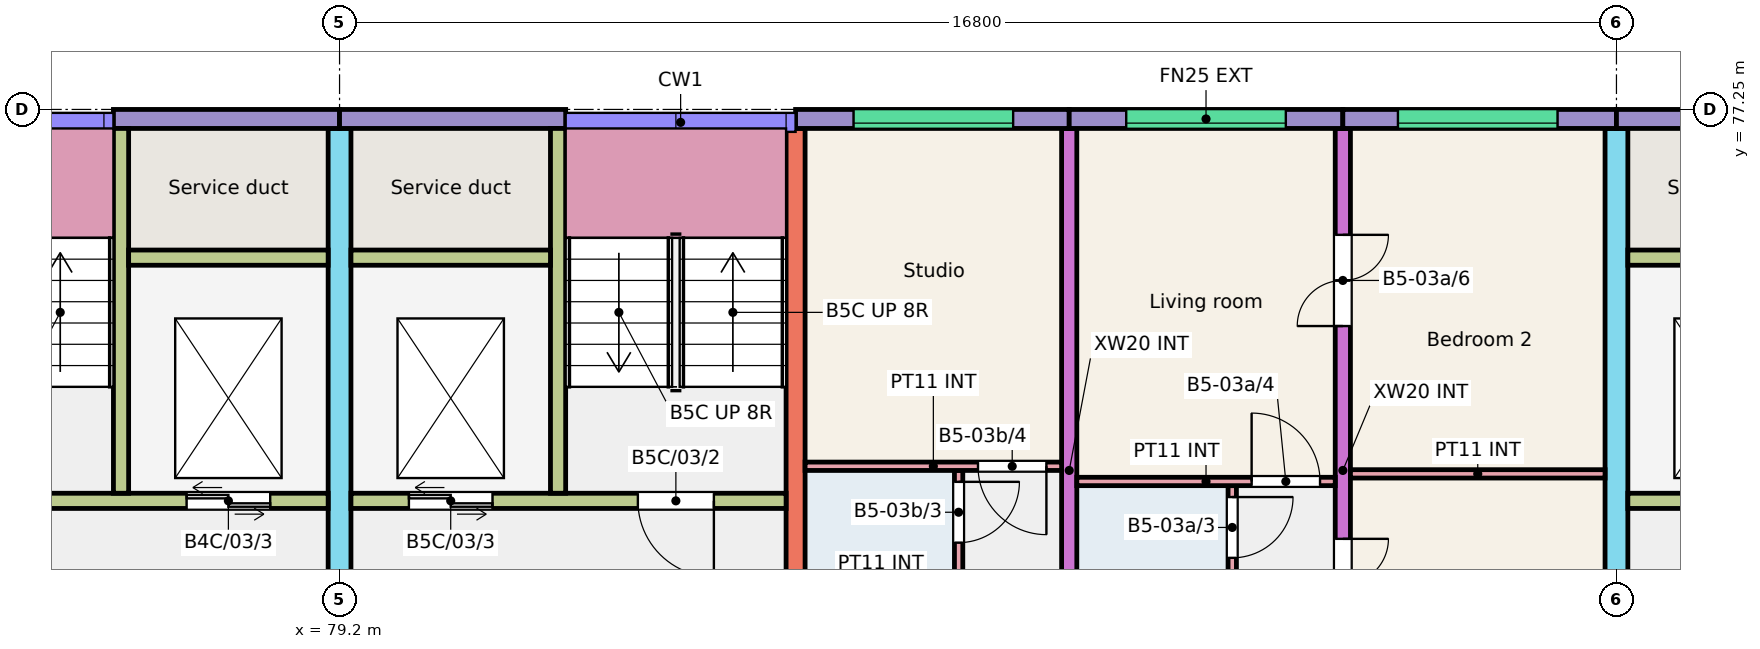
"""IFC4 building model, lengths in metres.
Left out: names, types, materials, properties, quantities, classifications, styles, units other than length and angle.
Written with IfcOpenShell. Run it as: python <this file> out.ifc"""

import sys

from ifc_helpers import new_model, si_unit, direction, frame, frame_2d, origin, place, context, subcontext, project, spatial, rectangle, extrude, element, fill, save


model = new_model("IFC4")
c1 = context("Model", 3, precision=1e-05, world=origin(), true_north=direction((0.0, 1.0)))
c2 = subcontext(c1, "Body", "Model", "MODEL_VIEW")
j1 = project(units=[si_unit("LENGTHUNIT", "METRE"), si_unit("PLANEANGLEUNIT", "RADIAN")], contexts=[c1])
p1 = place(None, origin())
s1 = spatial("IfcSite", under=j1, at=p1, CompositionType="ELEMENT")
p2 = place(p1, origin())
s2 = spatial("IfcBuilding", under=s1, at=p2, CompositionType="ELEMENT")
p3 = place(p2, frame((0.0, 0.0, 9.0)))
s3 = spatial("IfcBuildingStorey", under=s2, at=p3, CompositionType="ELEMENT", Elevation=9.0)
p4 = place(p3, frame((79.2, 66.0, 0.0), z_axis=(0.0, 0.0, 1.0), x_axis=(0.0, 1.0, 0.0)))
e1 = element("IfcWall", 1, at=p4, inside=s3, PredefinedType="SHEAR", context=c2, shape_type="SweptSolid", body=[
    extrude(rectangle(XDim=11.0, YDim=0.3, at=frame_2d((5.5, 0.0))), origin(), (0.0, 0.0, 1.0), 3.0),
])
p5 = place(p4, frame((0.3, 0.0, 0.0)))
e2 = element("IfcOpeningElement", 2, at=p5, cuts=e1, PredefinedType="OPENING", context=c2, shape_type="SweptSolid", body=[
    extrude(rectangle(XDim=1.2, YDim=2.1, at=frame_2d((0.6, 1.05))), frame((0.0, 0.16, 0.0), z_axis=(0.0, -1.0, 0.0), x_axis=(1.0, 0.0, 0.0)), (0.0, 0.0, 1.0), 0.32),
])
p6 = place(p3, frame((85.2, 68.0, 0.0), z_axis=(0.0, 0.0, 1.0), x_axis=(0.0, 1.0, 0.0)))
e3 = element("IfcWall", 3, at=p6, inside=s3, PredefinedType="SHEAR", context=c2, shape_type="SweptSolid", body=[
    extrude(rectangle(XDim=9.0, YDim=0.25, at=frame_2d((4.5, 0.0))), origin(), (0.0, 0.0, 1.0), 3.0),
])
p7 = place(p3, frame((88.8, 68.0, 0.0), z_axis=(0.0, 0.0, 1.0), x_axis=(0.0, 1.0, 0.0)))
e4 = element("IfcWall", 4, at=p7, inside=s3, PredefinedType="SHEAR", context=c2, shape_type="SweptSolid", body=[
    extrude(rectangle(XDim=9.0, YDim=0.2, at=frame_2d((4.5, 0.0))), origin(), (0.0, 0.0, 1.0), 3.0),
])
p8 = place(p3, frame((92.4, 68.0, 0.0), z_axis=(0.0, 0.0, 1.0), x_axis=(0.0, 1.0, 0.0)))
e5 = element("IfcWall", 5, at=p8, inside=s3, PredefinedType="SHEAR", context=c2, shape_type="SweptSolid", body=[
    extrude(rectangle(XDim=9.0, YDim=0.2, at=frame_2d((4.5, 0.0))), origin(), (0.0, 0.0, 1.0), 3.0),
])
p9 = place(p8, frame((2.4, 0.0, 0.0)))
e6 = element("IfcOpeningElement", 6, at=p9, cuts=e5, PredefinedType="OPENING", context=c2, shape_type="SweptSolid", body=[
    extrude(rectangle(XDim=1.2, YDim=2.1, at=frame_2d((0.6, 1.05))), frame((0.0, 0.11, 0.0), z_axis=(0.0, -1.0, 0.0), x_axis=(1.0, 0.0, 0.0)), (0.0, 0.0, 1.0), 0.22),
])
p10 = place(p8, frame((6.4, 0.0, 0.0)))
e7 = element("IfcOpeningElement", 7, at=p10, cuts=e5, PredefinedType="OPENING", context=c2, shape_type="SweptSolid", body=[
    extrude(rectangle(XDim=1.2, YDim=2.1, at=frame_2d((0.6, 1.05))), frame((0.0, 0.11, 0.0), z_axis=(0.0, -1.0, 0.0), x_axis=(1.0, 0.0, 0.0)), (0.0, 0.0, 1.0), 0.22),
])
p11 = place(p3, frame((96.0, 66.0, 0.0), z_axis=(0.0, 0.0, 1.0), x_axis=(0.0, 1.0, 0.0)))
e8 = element("IfcWall", 8, at=p11, inside=s3, PredefinedType="SHEAR", context=c2, shape_type="SweptSolid", body=[
    extrude(rectangle(XDim=11.0, YDim=0.3, at=frame_2d((5.5, 0.0))), origin(), (0.0, 0.0, 1.0), 3.0),
])
p12 = place(p11, frame((0.3, 0.0, 0.0)))
e9 = element("IfcOpeningElement", 9, at=p12, cuts=e8, PredefinedType="OPENING", context=c2, shape_type="SweptSolid", body=[
    extrude(rectangle(XDim=1.2, YDim=2.1, at=frame_2d((0.6, 1.05))), frame((0.0, 0.16, 0.0), z_axis=(0.0, -1.0, 0.0), x_axis=(1.0, 0.0, 0.0)), (0.0, 0.0, 1.0), 0.32),
])
p13 = place(p3, frame((76.225, 77.125, 0.0), z_axis=(0.0, 0.0, 1.0), x_axis=(1.0, 0.0, 0.0)))
e10 = element("IfcWall", 10, at=p13, inside=s3, PredefinedType="SOLIDWALL", context=c2, shape_type="SweptSolid", body=[
    extrude(rectangle(XDim=2.975, YDim=0.25, at=frame_2d((1.487, 0.0))), origin(), (0.0, 0.0, 1.0), 3.0),
])
p14 = place(p3, frame((73.325, 72.1, 0.0), z_axis=(0.0, 0.0, 1.0), x_axis=(1.0, 0.0, 0.0)))
e11 = element("IfcWall", 11, at=p14, inside=s3, PredefinedType="SHEAR", context=c2, shape_type="SweptSolid", body=[
    extrude(rectangle(XDim=5.725, YDim=0.2, at=frame_2d((2.863, 0.0))), origin(), (0.0, 0.0, 1.0), 3.0),
])
p15 = place(p14, frame((0.95, 0.0, 0.0)))
e12 = element("IfcOpeningElement", 12, at=p15, cuts=e11, PredefinedType="OPENING", context=c2, shape_type="SweptSolid", body=[
    extrude(rectangle(XDim=1.0, YDim=2.1, at=frame_2d((0.5, 1.05))), frame((0.0, 0.11, 0.0), z_axis=(0.0, -1.0, 0.0), x_axis=(1.0, 0.0, 0.0)), (0.0, 0.0, 1.0), 0.22),
])
p16 = place(p14, frame((3.863, 0.0, 0.0)))
e13 = element("IfcOpeningElement", 13, at=p16, cuts=e11, PredefinedType="OPENING", context=c2, shape_type="SweptSolid", body=[
    extrude(rectangle(XDim=1.1, YDim=2.1, at=frame_2d((0.55, 1.05))), frame((0.0, 0.11, 0.0), z_axis=(0.0, -1.0, 0.0), x_axis=(1.0, 0.0, 0.0)), (0.0, 0.0, 1.0), 0.22),
])
p17 = place(p3, frame((76.325, 72.2, 0.0), z_axis=(0.0, 0.0, 1.0), x_axis=(0.0, 1.0, 0.0)))
e14 = element("IfcWall", 14, at=p17, inside=s3, PredefinedType="SHEAR", context=c2, shape_type="SweptSolid", body=[
    extrude(rectangle(XDim=4.8, YDim=0.2, at=frame_2d((2.4, 0.0))), origin(), (0.0, 0.0, 1.0), 3.0),
])
p18 = place(p3, frame((76.425, 75.3, 0.0), z_axis=(0.0, 0.0, 1.0), x_axis=(1.0, 0.0, 0.0)))
e15 = element("IfcWall", 15, at=p18, inside=s3, PredefinedType="SHEAR", context=c2, shape_type="SweptSolid", body=[
    extrude(rectangle(XDim=2.625, YDim=0.2, at=frame_2d((1.312, 0.0))), origin(), (0.0, 0.0, 1.0), 3.0),
])
p19 = place(p3, frame((79.2, 77.125, 0.0), z_axis=(0.0, 0.0, 1.0), x_axis=(1.0, 0.0, 0.0)))
e16 = element("IfcWall", 16, at=p19, inside=s3, PredefinedType="SOLIDWALL", context=c2, shape_type="SweptSolid", body=[
    extrude(rectangle(XDim=2.975, YDim=0.25, at=frame_2d((1.488, 0.0))), origin(), (0.0, 0.0, 1.0), 3.0),
])
p20 = place(p3, frame((79.35, 72.1, 0.0), z_axis=(0.0, 0.0, 1.0), x_axis=(1.0, 0.0, 0.0)))
e17 = element("IfcWall", 17, at=p20, inside=s3, PredefinedType="SHEAR", context=c2, shape_type="SweptSolid", body=[
    extrude(rectangle(XDim=5.725, YDim=0.2, at=frame_2d((2.862, 0.0))), origin(), (0.0, 0.0, 1.0), 3.0),
])
p21 = place(p20, frame((3.775, 0.0, 0.0)))
e18 = element("IfcOpeningElement", 18, at=p21, cuts=e17, PredefinedType="OPENING", context=c2, shape_type="SweptSolid", body=[
    extrude(rectangle(XDim=1.0, YDim=2.1, at=frame_2d((0.5, 1.05))), frame((0.0, 0.11, 0.0), z_axis=(0.0, -1.0, 0.0), x_axis=(1.0, 0.0, 0.0)), (0.0, 0.0, 1.0), 0.22),
])
p22 = place(p20, frame((0.762, 0.0, 0.0)))
e19 = element("IfcOpeningElement", 19, at=p22, cuts=e17, PredefinedType="OPENING", context=c2, shape_type="SweptSolid", body=[
    extrude(rectangle(XDim=1.1, YDim=2.1, at=frame_2d((0.55, 1.05))), frame((0.0, 0.11, 0.0), z_axis=(0.0, -1.0, 0.0), x_axis=(1.0, 0.0, 0.0)), (0.0, 0.0, 1.0), 0.22),
])
p23 = place(p3, frame((82.075, 72.2, 0.0), z_axis=(0.0, 0.0, 1.0), x_axis=(0.0, 1.0, 0.0)))
e20 = element("IfcWall", 20, at=p23, inside=s3, PredefinedType="SHEAR", context=c2, shape_type="SweptSolid", body=[
    extrude(rectangle(XDim=4.8, YDim=0.2, at=frame_2d((2.4, 0.0))), origin(), (0.0, 0.0, 1.0), 3.0),
])
p24 = place(p3, frame((79.35, 75.3, 0.0), z_axis=(0.0, 0.0, 1.0), x_axis=(1.0, 0.0, 0.0)))
e21 = element("IfcWall", 21, at=p24, inside=s3, PredefinedType="SHEAR", context=c2, shape_type="SweptSolid", body=[
    extrude(rectangle(XDim=2.625, YDim=0.2, at=frame_2d((1.312, 0.0))), origin(), (0.0, 0.0, 1.0), 3.0),
])
p25 = place(p3, frame((85.2, 77.125, 0.0), z_axis=(0.0, 0.0, 1.0), x_axis=(1.0, 0.0, 0.0)))
e22 = element("IfcWall", 22, at=p25, inside=s3, PredefinedType="SOLIDWALL", context=c2, shape_type="SweptSolid", body=[
    extrude(rectangle(XDim=3.6, YDim=0.25, at=frame_2d((1.8, 0.0))), origin(), (0.0, 0.0, 1.0), 3.0),
])
p26 = place(p25, frame((0.762, 0.0, 1.2)))
e23 = element("IfcOpeningElement", 23, at=p26, cuts=e22, PredefinedType="OPENING", context=c2, shape_type="SweptSolid", body=[
    extrude(rectangle(XDim=2.1, YDim=1.2, at=frame_2d((1.05, 0.6))), frame((0.0, 0.135, 0.0), z_axis=(0.0, -1.0, 0.0), x_axis=(1.0, 0.0, 0.0)), (0.0, 0.0, 1.0), 0.27),
])
p27 = place(p3, frame((88.8, 77.125, 0.0), z_axis=(0.0, 0.0, 1.0), x_axis=(1.0, 0.0, 0.0)))
e24 = element("IfcWall", 24, at=p27, inside=s3, PredefinedType="SOLIDWALL", context=c2, shape_type="SweptSolid", body=[
    extrude(rectangle(XDim=3.6, YDim=0.25, at=frame_2d((1.8, 0.0))), origin(), (0.0, 0.0, 1.0), 3.0),
])
p28 = place(p27, frame((0.75, 0.0, 1.2)))
e25 = element("IfcOpeningElement", 25, at=p28, cuts=e24, PredefinedType="OPENING", context=c2, shape_type="SweptSolid", body=[
    extrude(rectangle(XDim=2.1, YDim=1.2, at=frame_2d((1.05, 0.6))), frame((0.0, 0.135, 0.0), z_axis=(0.0, -1.0, 0.0), x_axis=(1.0, 0.0, 0.0)), (0.0, 0.0, 1.0), 0.27),
])
p29 = place(p3, frame((92.4, 77.125, 0.0), z_axis=(0.0, 0.0, 1.0), x_axis=(1.0, 0.0, 0.0)))
e26 = element("IfcWall", 26, at=p29, inside=s3, PredefinedType="SOLIDWALL", context=c2, shape_type="SweptSolid", body=[
    extrude(rectangle(XDim=3.6, YDim=0.25, at=frame_2d((1.8, 0.0))), origin(), (0.0, 0.0, 1.0), 3.0),
])
p30 = place(p29, frame((0.725, 0.0, 1.2)))
e27 = element("IfcOpeningElement", 27, at=p30, cuts=e26, PredefinedType="OPENING", context=c2, shape_type="SweptSolid", body=[
    extrude(rectangle(XDim=2.1, YDim=1.2, at=frame_2d((1.05, 0.6))), frame((0.0, 0.135, 0.0), z_axis=(0.0, -1.0, 0.0), x_axis=(1.0, 0.0, 0.0)), (0.0, 0.0, 1.0), 0.27),
])
p31 = place(p3, frame((96.0, 77.125, 0.0), z_axis=(0.0, 0.0, 1.0), x_axis=(1.0, 0.0, 0.0)))
e28 = element("IfcWall", 28, at=p31, inside=s3, PredefinedType="SOLIDWALL", context=c2, shape_type="SweptSolid", body=[
    extrude(rectangle(XDim=2.975, YDim=0.25, at=frame_2d((1.488, 0.0))), origin(), (0.0, 0.0, 1.0), 3.0),
])
p32 = place(p3, frame((96.15, 72.1, 0.0), z_axis=(0.0, 0.0, 1.0), x_axis=(1.0, 0.0, 0.0)))
e29 = element("IfcWall", 29, at=p32, inside=s3, PredefinedType="SHEAR", context=c2, shape_type="SweptSolid", body=[
    extrude(rectangle(XDim=5.725, YDim=0.2, at=frame_2d((2.863, 0.0))), origin(), (0.0, 0.0, 1.0), 3.0),
])
p33 = place(p32, frame((3.775, 0.0, 0.0)))
e30 = element("IfcOpeningElement", 30, at=p33, cuts=e29, PredefinedType="OPENING", context=c2, shape_type="SweptSolid", body=[
    extrude(rectangle(XDim=1.0, YDim=2.1, at=frame_2d((0.5, 1.05))), frame((0.0, 0.11, 0.0), z_axis=(0.0, -1.0, 0.0), x_axis=(1.0, 0.0, 0.0)), (0.0, 0.0, 1.0), 0.22),
])
p34 = place(p32, frame((0.762, 0.0, 0.0)))
e31 = element("IfcOpeningElement", 31, at=p34, cuts=e29, PredefinedType="OPENING", context=c2, shape_type="SweptSolid", body=[
    extrude(rectangle(XDim=1.1, YDim=2.1, at=frame_2d((0.55, 1.05))), frame((0.0, 0.11, 0.0), z_axis=(0.0, -1.0, 0.0), x_axis=(1.0, 0.0, 0.0)), (0.0, 0.0, 1.0), 0.22),
])
p35 = place(p3, frame((96.15, 75.3, 0.0), z_axis=(0.0, 0.0, 1.0), x_axis=(1.0, 0.0, 0.0)))
e32 = element("IfcWall", 32, at=p35, inside=s3, PredefinedType="SHEAR", context=c2, shape_type="SweptSolid", body=[
    extrude(rectangle(XDim=2.625, YDim=0.2, at=frame_2d((1.312, 0.0))), origin(), (0.0, 0.0, 1.0), 3.0),
])
p36 = place(p3, frame((90.945, 68.0, 0.0), z_axis=(0.0, 0.0, 1.0), x_axis=(0.0, 1.0, 0.0)))
e33 = element("IfcWall", 33, at=p36, inside=s3, PredefinedType="PARTITIONING", context=c2, shape_type="SweptSolid", body=[
    extrude(rectangle(XDim=4.3, YDim=0.11, at=frame_2d((2.15, 0.0))), origin(), (0.0, 0.0, 1.0), 2.8),
])
p37 = place(p36, frame((0.2, 0.0, 0.0)))
e34 = element("IfcOpeningElement", 34, at=p37, cuts=e33, PredefinedType="OPENING", context=c2, shape_type="SweptSolid", body=[
    extrude(rectangle(XDim=0.8, YDim=2.1, at=frame_2d((0.4, 1.05))), frame((0.0, 0.065, 0.0), z_axis=(0.0, -1.0, 0.0), x_axis=(1.0, 0.0, 0.0)), (0.0, 0.0, 1.0), 0.13),
])
p38 = place(p36, frame((3.35, 0.0, 0.0)))
e35 = element("IfcOpeningElement", 35, at=p38, cuts=e33, PredefinedType="OPENING", context=c2, shape_type="SweptSolid", body=[
    extrude(rectangle(XDim=0.8, YDim=2.1, at=frame_2d((0.4, 1.05))), frame((0.0, 0.065, 0.0), z_axis=(0.0, -1.0, 0.0), x_axis=(1.0, 0.0, 0.0)), (0.0, 0.0, 1.0), 0.13),
])
p39 = place(p3, frame((88.9, 72.355, 0.0), z_axis=(0.0, 0.0, 1.0), x_axis=(1.0, 0.0, 0.0)))
e36 = element("IfcWall", 36, at=p39, inside=s3, PredefinedType="PARTITIONING", context=c2, shape_type="SweptSolid", body=[
    extrude(rectangle(XDim=3.4, YDim=0.11, at=frame_2d((1.7, 0.0))), origin(), (0.0, 0.0, 1.0), 2.8),
])
p40 = place(p39, frame((2.3, 0.0, 0.0)))
e37 = element("IfcOpeningElement", 37, at=p40, cuts=e36, PredefinedType="OPENING", context=c2, shape_type="SweptSolid", body=[
    extrude(rectangle(XDim=0.9, YDim=2.1, at=frame_2d((0.45, 1.05))), frame((0.0, 0.065, 0.0), z_axis=(0.0, -1.0, 0.0), x_axis=(1.0, 0.0, 0.0)), (0.0, 0.0, 1.0), 0.13),
])
p41 = place(p3, frame((92.5, 72.455, 0.0), z_axis=(0.0, 0.0, 1.0), x_axis=(1.0, 0.0, 0.0)))
e38 = element("IfcWall", 38, at=p41, inside=s3, PredefinedType="PARTITIONING", context=c2, shape_type="SweptSolid", body=[
    extrude(rectangle(XDim=3.35, YDim=0.11, at=frame_2d((1.675, 0.0))), origin(), (0.0, 0.0, 1.0), 2.8),
])
p42 = place(p3, frame((87.345, 68.0, 0.0), z_axis=(0.0, 0.0, 1.0), x_axis=(0.0, 1.0, 0.0)))
e39 = element("IfcWall", 39, at=p42, inside=s3, PredefinedType="PARTITIONING", context=c2, shape_type="SweptSolid", body=[
    extrude(rectangle(XDim=4.5, YDim=0.11, at=frame_2d((2.25, 0.0))), origin(), (0.0, 0.0, 1.0), 2.8),
])
p43 = place(p42, frame((0.2, 0.0, 0.0)))
e40 = element("IfcOpeningElement", 40, at=p43, cuts=e39, PredefinedType="OPENING", context=c2, shape_type="SweptSolid", body=[
    extrude(rectangle(XDim=0.8, YDim=2.1, at=frame_2d((0.4, 1.05))), frame((0.0, 0.065, 0.0), z_axis=(0.0, -1.0, 0.0), x_axis=(1.0, 0.0, 0.0)), (0.0, 0.0, 1.0), 0.13),
])
p44 = place(p42, frame((3.55, 0.0, 0.0)))
e41 = element("IfcOpeningElement", 41, at=p44, cuts=e39, PredefinedType="OPENING", context=c2, shape_type="SweptSolid", body=[
    extrude(rectangle(XDim=0.8, YDim=2.1, at=frame_2d((0.4, 1.05))), frame((0.0, 0.065, 0.0), z_axis=(0.0, -1.0, 0.0), x_axis=(1.0, 0.0, 0.0)), (0.0, 0.0, 1.0), 0.13),
])
p45 = place(p3, frame((85.325, 72.555, 0.0), z_axis=(0.0, 0.0, 1.0), x_axis=(1.0, 0.0, 0.0)))
e42 = element("IfcWall", 42, at=p45, inside=s3, PredefinedType="PARTITIONING", context=c2, shape_type="SweptSolid", body=[
    extrude(rectangle(XDim=3.375, YDim=0.11, at=frame_2d((1.688, 0.0))), origin(), (0.0, 0.0, 1.0), 2.8),
])
p46 = place(p45, frame((2.275, 0.0, 0.0)))
e43 = element("IfcOpeningElement", 43, at=p46, cuts=e42, PredefinedType="OPENING", context=c2, shape_type="SweptSolid", body=[
    extrude(rectangle(XDim=0.9, YDim=2.1, at=frame_2d((0.45, 1.05))), frame((0.0, 0.065, 0.0), z_axis=(0.0, -1.0, 0.0), x_axis=(1.0, 0.0, 0.0)), (0.0, 0.0, 1.0), 0.13),
])
p47 = place(p30, origin())
e44 = element("IfcWindow", 44, at=p47, inside=s3, PartitioningType="SINGLE_PANEL", PredefinedType="WINDOW", context=c2, shape_type="SweptSolid", body=[
    extrude(rectangle(XDim=2.1, YDim=1.2, at=frame_2d((1.05, 0.6))), frame((0.0, -0.025, 0.0), z_axis=(0.0, -1.0, 0.0), x_axis=(1.0, 0.0, 0.0)), (0.0, 0.0, 1.0), 0.06),
])
fill(e27, e44)
p48 = place(p28, origin())
e45 = element("IfcWindow", 45, at=p48, inside=s3, PartitioningType="SINGLE_PANEL", PredefinedType="WINDOW", context=c2, shape_type="SweptSolid", body=[
    extrude(rectangle(XDim=2.1, YDim=1.2, at=frame_2d((1.05, 0.6))), frame((0.0, -0.025, 0.0), z_axis=(0.0, -1.0, 0.0), x_axis=(1.0, 0.0, 0.0)), (0.0, 0.0, 1.0), 0.06),
])
fill(e25, e45)
p49 = place(p26, origin())
e46 = element("IfcWindow", 46, at=p49, inside=s3, PartitioningType="SINGLE_PANEL", PredefinedType="WINDOW", context=c2, shape_type="SweptSolid", body=[
    extrude(rectangle(XDim=2.1, YDim=1.2, at=frame_2d((1.05, 0.6))), frame((0.0, -0.025, 0.0), z_axis=(0.0, -1.0, 0.0), x_axis=(1.0, 0.0, 0.0)), (0.0, 0.0, 1.0), 0.06),
])
fill(e23, e46)
p50 = place(p38, origin())
e47 = element("IfcDoor", 47, at=p50, inside=s3, OperationType="SINGLE_SWING_RIGHT", PredefinedType="DOOR", context=c2, shape_type="SweptSolid", body=[
    extrude(rectangle(XDim=0.8, YDim=2.1, at=frame_2d((0.4, 1.05))), frame((0.0, 0.025, 0.0), z_axis=(0.0, -1.0, 0.0), x_axis=(1.0, 0.0, 0.0)), (0.0, 0.0, 1.0), 0.05),
])
fill(e35, e47)
p51 = place(p40, origin())
e48 = element("IfcDoor", 48, at=p51, inside=s3, OperationType="SINGLE_SWING_LEFT", PredefinedType="DOOR", context=c2, shape_type="SweptSolid", body=[
    extrude(rectangle(XDim=0.9, YDim=2.1, at=frame_2d((0.45, 1.05))), frame((0.0, 0.025, 0.0), z_axis=(0.0, -1.0, 0.0), x_axis=(1.0, 0.0, 0.0)), (0.0, 0.0, 1.0), 0.05),
])
fill(e37, e48)
p52 = place(p9, origin())
e49 = element("IfcDoor", 49, at=p52, inside=s3, OperationType="DOUBLE_DOOR_SINGLE_SWING", PredefinedType="DOOR", context=c2, shape_type="SweptSolid", body=[
    extrude(rectangle(XDim=1.2, YDim=2.1, at=frame_2d((0.6, 1.05))), frame((0.0, 0.025, 0.0), z_axis=(0.0, -1.0, 0.0), x_axis=(1.0, 0.0, 0.0)), (0.0, 0.0, 1.0), 0.05),
])
fill(e6, e49)
p53 = place(p10, origin())
e50 = element("IfcDoor", 50, at=p53, inside=s3, OperationType="DOUBLE_DOOR_SINGLE_SWING", PredefinedType="DOOR", context=c2, shape_type="SweptSolid", body=[
    extrude(rectangle(XDim=1.2, YDim=2.1, at=frame_2d((0.6, 1.05))), frame((0.0, 0.025, 0.0), z_axis=(0.0, -1.0, 0.0), x_axis=(1.0, 0.0, 0.0)), (0.0, 0.0, 1.0), 0.05),
])
fill(e7, e50)
p54 = place(p44, origin())
e51 = element("IfcDoor", 51, at=p54, inside=s3, OperationType="SINGLE_SWING_RIGHT", PredefinedType="DOOR", context=c2, shape_type="SweptSolid", body=[
    extrude(rectangle(XDim=0.8, YDim=2.1, at=frame_2d((0.4, 1.05))), frame((0.0, 0.025, 0.0), z_axis=(0.0, -1.0, 0.0), x_axis=(1.0, 0.0, 0.0)), (0.0, 0.0, 1.0), 0.05),
])
fill(e41, e51)
p55 = place(p46, origin())
e52 = element("IfcDoor", 52, at=p55, inside=s3, OperationType="SINGLE_SWING_RIGHT", PredefinedType="DOOR", context=c2, shape_type="SweptSolid", body=[
    extrude(rectangle(XDim=0.9, YDim=2.1, at=frame_2d((0.45, 1.05))), frame((0.0, 0.025, 0.0), z_axis=(0.0, -1.0, 0.0), x_axis=(1.0, 0.0, 0.0)), (0.0, 0.0, 1.0), 0.05),
])
fill(e43, e52)
p56 = place(p16, origin())
e53 = element("IfcDoor", 53, at=p56, inside=s3, OperationType="DOUBLE_DOOR_SLIDING", PredefinedType="DOOR", context=c2, shape_type="SweptSolid", body=[
    extrude(rectangle(XDim=1.1, YDim=2.1, at=frame_2d((0.55, 1.05))), frame((0.0, 0.025, 0.0), z_axis=(0.0, -1.0, 0.0), x_axis=(1.0, 0.0, 0.0)), (0.0, 0.0, 1.0), 0.05),
])
fill(e13, e53)
p57 = place(p21, origin())
e54 = element("IfcDoor", 54, at=p57, inside=s3, OperationType="SINGLE_SWING_RIGHT", PredefinedType="DOOR", context=c2, shape_type="SweptSolid", body=[
    extrude(rectangle(XDim=1.0, YDim=2.1, at=frame_2d((0.5, 1.05))), frame((0.0, 0.025, 0.0), z_axis=(0.0, -1.0, 0.0), x_axis=(1.0, 0.0, 0.0)), (0.0, 0.0, 1.0), 0.05),
])
fill(e18, e54)
p58 = place(p22, origin())
e55 = element("IfcDoor", 55, at=p58, inside=s3, OperationType="DOUBLE_DOOR_SLIDING", PredefinedType="DOOR", context=c2, shape_type="SweptSolid", body=[
    extrude(rectangle(XDim=1.1, YDim=2.1, at=frame_2d((0.55, 1.05))), frame((0.0, 0.025, 0.0), z_axis=(0.0, -1.0, 0.0), x_axis=(1.0, 0.0, 0.0)), (0.0, 0.0, 1.0), 0.05),
])
fill(e19, e55)
save(model, sys.argv[1])
